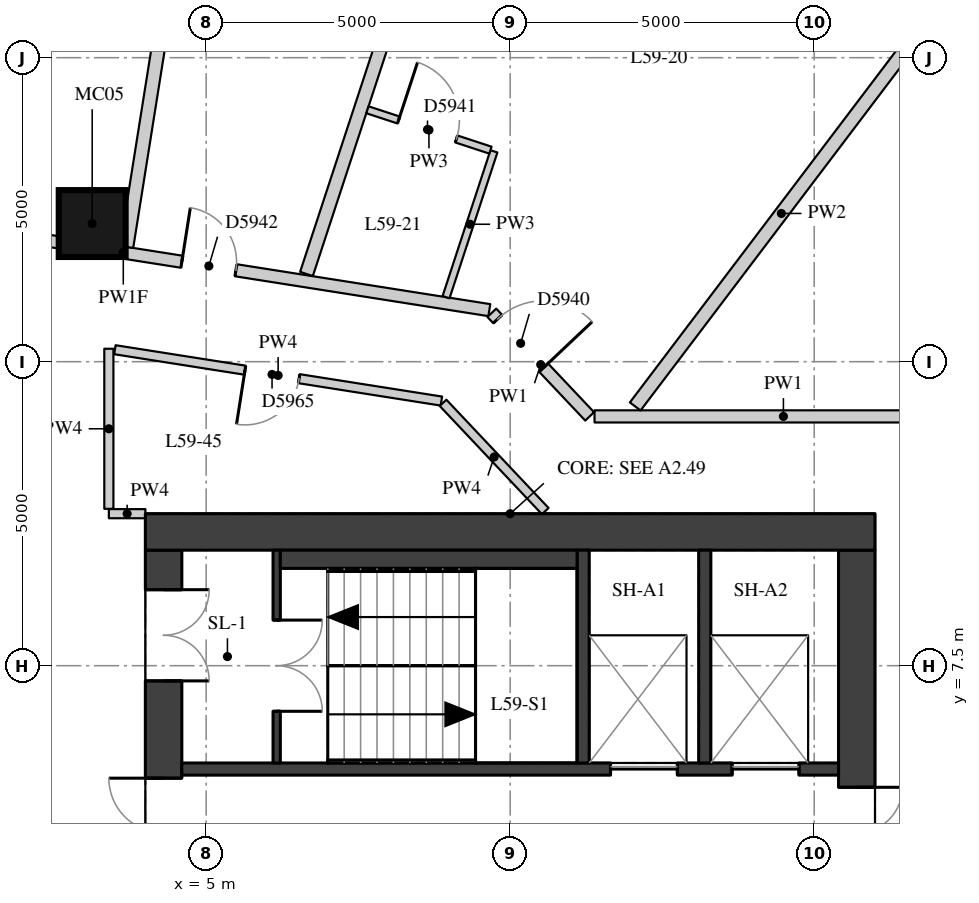
"""IFC4 building model, lengths in metres.
Left out: names, types, materials, properties, quantities, classifications, styles, units other than length and angle.
Written with IfcOpenShell. Run it as: python <this file> out.ifc"""

import sys

from ifc_helpers import new_model, si_unit, direction, frame, frame_2d, origin, origin_2d, place, context, subcontext, project, spatial, rectangle, extrude, element, fill, save


model = new_model("IFC4")
c1 = context("Model", 3, precision=1e-05, world=origin(), true_north=direction((0.0, 1.0)))
c2 = subcontext(c1, "Body", "Model", "MODEL_VIEW")
j1 = project(units=[si_unit("LENGTHUNIT", "METRE"), si_unit("PLANEANGLEUNIT", "RADIAN")], contexts=[c1])
p1 = place(None, origin())
s1 = spatial("IfcSite", under=j1, at=p1, CompositionType="ELEMENT")
p2 = place(p1, origin())
s2 = spatial("IfcBuilding", under=s1, at=p2, CompositionType="ELEMENT")
p3 = place(p2, frame((0.0, 0.0, 209.0)))
s3 = spatial("IfcBuildingStorey", under=s2, at=p3, CompositionType="ELEMENT", Elevation=209.0)
p4 = place(p3, frame((3.126, 14.772, 0.0), z_axis=(0.0, 0.0, 1.0), x_axis=(1.0, 0.0, 0.0)))
e1 = element("IfcColumn", 1, at=p4, inside=s3, PredefinedType="COLUMN", context=c2, shape_type="SweptSolid", body=[
    extrude(rectangle(XDim=1.1, YDim=1.1, at=origin_2d()), origin(), (0.0, 0.0, 1.0), 3.3),
])
p5 = place(p3, frame((4.3, -9.4, 0.0), z_axis=(0.0, 0.0, 1.0), x_axis=(0.0, 1.0, 0.0)))
e2 = element("IfcWall", 2, at=p5, inside=s3, PredefinedType="SHEAR", context=c2, shape_type="SweptSolid", body=[
    extrude(rectangle(XDim=18.8, YDim=0.6, at=frame_2d((9.4, 0.0))), origin(), (0.0, 0.0, 1.0), 3.02),
])
p6 = place(p5, frame((0.65, 0.0, 0.0)))
e3 = element("IfcOpeningElement", 3, at=p6, cuts=e2, PredefinedType="OPENING", context=c2, shape_type="SweptSolid", body=[
    extrude(rectangle(XDim=1.5, YDim=2.1, at=frame_2d((0.75, 1.05))), frame((0.0, 0.31, 0.0), z_axis=(0.0, -1.0, 0.0), x_axis=(1.0, 0.0, 0.0)), (0.0, 0.0, 1.0), 0.62),
])
p7 = place(p5, frame((3.75, 0.0, 0.0)))
e4 = element("IfcOpeningElement", 4, at=p7, cuts=e2, PredefinedType="OPENING", context=c2, shape_type="SweptSolid", body=[
    extrude(rectangle(XDim=1.8, YDim=2.1, at=frame_2d((0.9, 1.05))), frame((0.0, 0.31, 0.0), z_axis=(0.0, -1.0, 0.0), x_axis=(1.0, 0.0, 0.0)), (0.0, 0.0, 1.0), 0.62),
])
p8 = place(p5, frame((6.25, 0.0, 0.0)))
e5 = element("IfcOpeningElement", 5, at=p8, cuts=e2, PredefinedType="OPENING", context=c2, shape_type="SweptSolid", body=[
    extrude(rectangle(XDim=1.1, YDim=2.1, at=frame_2d((0.55, 1.05))), frame((0.0, 0.31, 0.0), z_axis=(0.0, -1.0, 0.0), x_axis=(1.0, 0.0, 0.0)), (0.0, 0.0, 1.0), 0.62),
])
p9 = place(p5, frame((8.9, 0.0, 0.0)))
e6 = element("IfcOpeningElement", 6, at=p9, cuts=e2, PredefinedType="OPENING", context=c2, shape_type="SweptSolid", body=[
    extrude(rectangle(XDim=1.0, YDim=2.1, at=frame_2d((0.5, 1.05))), frame((0.0, 0.31, 0.0), z_axis=(0.0, -1.0, 0.0), x_axis=(1.0, 0.0, 0.0)), (0.0, 0.0, 1.0), 0.62),
])
p10 = place(p5, frame((11.45, 0.0, 0.0)))
e7 = element("IfcOpeningElement", 7, at=p10, cuts=e2, PredefinedType="OPENING", context=c2, shape_type="SweptSolid", body=[
    extrude(rectangle(XDim=1.1, YDim=2.1, at=frame_2d((0.55, 1.05))), frame((0.0, 0.31, 0.0), z_axis=(0.0, -1.0, 0.0), x_axis=(1.0, 0.0, 0.0)), (0.0, 0.0, 1.0), 0.62),
])
p11 = place(p5, frame((13.25, 0.0, 0.0)))
e8 = element("IfcOpeningElement", 8, at=p11, cuts=e2, PredefinedType="OPENING", context=c2, shape_type="SweptSolid", body=[
    extrude(rectangle(XDim=1.8, YDim=2.1, at=frame_2d((0.9, 1.05))), frame((0.0, 0.31, 0.0), z_axis=(0.0, -1.0, 0.0), x_axis=(1.0, 0.0, 0.0)), (0.0, 0.0, 1.0), 0.62),
])
p12 = place(p5, frame((16.65, 0.0, 0.0)))
e9 = element("IfcOpeningElement", 9, at=p12, cuts=e2, PredefinedType="OPENING", context=c2, shape_type="SweptSolid", body=[
    extrude(rectangle(XDim=1.5, YDim=2.1, at=frame_2d((0.75, 1.05))), frame((0.0, 0.31, 0.0), z_axis=(0.0, -1.0, 0.0), x_axis=(1.0, 0.0, 0.0)), (0.0, 0.0, 1.0), 0.62),
])
p13 = place(p3, frame((15.7, -9.4, 0.0), z_axis=(0.0, 0.0, 1.0), x_axis=(0.0, 1.0, 0.0)))
e10 = element("IfcWall", 10, at=p13, inside=s3, PredefinedType="SHEAR", context=c2, shape_type="SweptSolid", body=[
    extrude(rectangle(XDim=18.8, YDim=0.6, at=frame_2d((9.4, 0.0))), origin(), (0.0, 0.0, 1.0), 3.02),
])
p14 = place(p13, frame((13.4, 0.0, 0.0)))
e11 = element("IfcOpeningElement", 11, at=p14, cuts=e10, PredefinedType="OPENING", context=c2, shape_type="SweptSolid", body=[
    extrude(rectangle(XDim=1.5, YDim=2.1, at=frame_2d((0.75, 1.05))), frame((0.0, 0.31, 0.0), z_axis=(0.0, -1.0, 0.0), x_axis=(1.0, 0.0, 0.0)), (0.0, 0.0, 1.0), 0.62),
])
p15 = place(p13, frame((3.9, 0.0, 0.0)))
e12 = element("IfcOpeningElement", 12, at=p15, cuts=e10, PredefinedType="OPENING", context=c2, shape_type="SweptSolid", body=[
    extrude(rectangle(XDim=1.5, YDim=2.1, at=frame_2d((0.75, 1.05))), frame((0.0, 0.31, 0.0), z_axis=(0.0, -1.0, 0.0), x_axis=(1.0, 0.0, 0.0)), (0.0, 0.0, 1.0), 0.62),
])
p16 = place(p3, frame((4.0, 9.7, 0.0), z_axis=(0.0, 0.0, 1.0), x_axis=(1.0, 0.0, 0.0)))
e13 = element("IfcWall", 13, at=p16, inside=s3, PredefinedType="SHEAR", context=c2, shape_type="SweptSolid", body=[
    extrude(rectangle(XDim=12.0, YDim=0.6, at=frame_2d((6.0, 0.0))), origin(), (0.0, 0.0, 1.0), 3.02),
])
p17 = place(p3, frame((4.6, 5.8, 0.0), z_axis=(0.0, 0.0, 1.0), x_axis=(1.0, 0.0, 0.0)))
e14 = element("IfcWall", 14, at=p17, inside=s3, PredefinedType="SHEAR", context=c2, shape_type="SweptSolid", body=[
    extrude(rectangle(XDim=10.8, YDim=0.2, at=frame_2d((5.4, 0.0))), origin(), (0.0, 0.0, 1.0), 3.02),
])
p18 = place(p17, frame((7.05, 0.0, 0.0)))
e15 = element("IfcOpeningElement", 15, at=p18, cuts=e14, PredefinedType="OPENING", context=c2, shape_type="SweptSolid", body=[
    extrude(rectangle(XDim=1.1, YDim=2.1, at=frame_2d((0.55, 1.05))), frame((0.0, 0.11, 0.0), z_axis=(0.0, -1.0, 0.0), x_axis=(1.0, 0.0, 0.0)), (0.0, 0.0, 1.0), 0.22),
])
p19 = place(p17, frame((9.05, 0.0, 0.0)))
e16 = element("IfcOpeningElement", 16, at=p19, cuts=e14, PredefinedType="OPENING", context=c2, shape_type="SweptSolid", body=[
    extrude(rectangle(XDim=1.1, YDim=2.1, at=frame_2d((0.55, 1.05))), frame((0.0, 0.11, 0.0), z_axis=(0.0, -1.0, 0.0), x_axis=(1.0, 0.0, 0.0)), (0.0, 0.0, 1.0), 0.22),
])
for number, where, z_axis, x_axis in (
    (17, (11.2, 5.9, 0.0), (0.0, 0.0, 1.0), (0.0, 1.0, 0.0)),
    (18, (13.2, 5.9, 0.0), (0.0, 0.0, 1.0), (0.0, 1.0, 0.0)),
):
    element("IfcWall", number, at=place(p3, frame(where, z_axis=z_axis, x_axis=x_axis)), inside=s3, PredefinedType="SHEAR", context=c2, shape_type="SweptSolid", body=[
        extrude(rectangle(XDim=3.5, YDim=0.2, at=frame_2d((1.75, 0.0))), origin(), (0.0, 0.0, 1.0), 3.02),
    ])
p20 = place(p3, frame((6.16, 5.9, 0.0), z_axis=(0.0, 0.0, 1.0), x_axis=(0.0, 1.0, 0.0)))
e19 = element("IfcWall", 19, at=p20, inside=s3, PredefinedType="SHEAR", context=c2, shape_type="SweptSolid", body=[
    extrude(rectangle(XDim=3.5, YDim=0.12, at=frame_2d((1.75, 0.0))), origin(), (0.0, 0.0, 1.0), 3.02),
])
p21 = place(p20, frame((0.85, 0.0, 0.0)))
e20 = element("IfcOpeningElement", 20, at=p21, cuts=e19, PredefinedType="OPENING", context=c2, shape_type="SweptSolid", body=[
    extrude(rectangle(XDim=1.5, YDim=2.1, at=frame_2d((0.75, 1.05))), frame((0.0, 0.07, 0.0), z_axis=(0.0, -1.0, 0.0), x_axis=(1.0, 0.0, 0.0)), (0.0, 0.0, 1.0), 0.14),
])
p22 = place(p3, frame((6.22, 9.25, 0.0), z_axis=(0.0, 0.0, 1.0), x_axis=(1.0, 0.0, 0.0)))
e21 = element("IfcWall", 21, at=p22, inside=s3, PredefinedType="PARTITIONING", context=c2, shape_type="SweptSolid", body=[
    extrude(rectangle(XDim=4.88, YDim=0.3, at=frame_2d((2.44, 0.0))), origin(), (0.0, 0.0, 1.0), 3.02),
])
p23 = place(p3, frame((-2.383, 15.243, 0.0), z_axis=(0.0, 0.0, 1.0), x_axis=(0.987842256944, -0.15545956193, 0.0)))
e22 = element("IfcWall", 22, at=p23, inside=s3, PredefinedType="PARTITIONING", context=c2, shape_type="SweptSolid", body=[
    extrude(rectangle(XDim=12.188, YDim=0.2, at=frame_2d((6.094, 0.0))), origin(), (0.0, 0.0, 1.0), 2.42),
])
p24 = place(p23, frame((7.069, 0.0, 0.0)))
e23 = element("IfcOpeningElement", 23, at=p24, cuts=e22, PredefinedType="OPENING", context=c2, shape_type="SweptSolid", body=[
    extrude(rectangle(XDim=0.9, YDim=2.1, at=frame_2d((0.45, 1.05))), frame((0.0, 0.11, 0.0), z_axis=(0.0, -1.0, 0.0), x_axis=(1.0, 0.0, 0.0)), (0.0, 0.0, 1.0), 0.22),
])
p25 = place(p23, frame((3.676, 0.0, 0.0)))
e24 = element("IfcOpeningElement", 24, at=p25, cuts=e22, PredefinedType="OPENING", context=c2, shape_type="SweptSolid", body=[
    extrude(rectangle(XDim=0.9, YDim=2.1, at=frame_2d((0.45, 1.05))), frame((0.0, 0.11, 0.0), z_axis=(0.0, -1.0, 0.0), x_axis=(1.0, 0.0, 0.0)), (0.0, 0.0, 1.0), 0.22),
])
p26 = place(p23, frame((1.875, 0.0, 0.0)))
e25 = element("IfcOpeningElement", 25, at=p26, cuts=e22, PredefinedType="OPENING", context=c2, shape_type="SweptSolid", body=[
    extrude(rectangle(XDim=0.9, YDim=2.1, at=frame_2d((0.45, 1.05))), frame((0.0, 0.11, 0.0), z_axis=(0.0, -1.0, 0.0), x_axis=(1.0, 0.0, 0.0)), (0.0, 0.0, 1.0), 0.22),
])
p27 = place(p3, frame((9.698, 13.304, 0.0), z_axis=(0.0, 0.0, 1.0), x_axis=(0.686553169295, -0.727079600684, 0.0)))
e26 = element("IfcWall", 26, at=p27, inside=s3, PredefinedType="PARTITIONING", context=c2, shape_type="SweptSolid", body=[
    extrude(rectangle(XDim=2.344, YDim=0.2, at=frame_2d((1.172, 0.0))), origin(), (0.0, 0.0, 1.0), 3.02),
])
p28 = place(p27, frame((0.14, 0.0, 0.0)))
e27 = element("IfcOpeningElement", 27, at=p28, cuts=e26, PredefinedType="OPENING", context=c2, shape_type="SweptSolid", body=[
    extrude(rectangle(XDim=1.1, YDim=2.1, at=frame_2d((0.55, 1.05))), frame((0.0, 0.11, 0.0), z_axis=(0.0, -1.0, 0.0), x_axis=(1.0, 0.0, 0.0)), (0.0, 0.0, 1.0), 0.22),
])
p29 = place(p3, frame((11.387, 11.6, 0.0), z_axis=(0.0, 0.0, 1.0), x_axis=(1.0, 0.0, 0.0)))
e28 = element("IfcWall", 28, at=p29, inside=s3, PredefinedType="PARTITIONING", context=c2, shape_type="SweptSolid", body=[
    extrude(rectangle(XDim=6.213, YDim=0.2, at=frame_2d((3.106, 0.0))), origin(), (0.0, 0.0, 1.0), 3.02),
])
p30 = place(p3, frame((4.001, 10.0, 0.0), z_axis=(0.0, 0.0, 1.0), x_axis=(-1.0, 0.0, 0.0)))
e29 = element("IfcWall", 29, at=p30, inside=s3, PredefinedType="PARTITIONING", context=c2, shape_type="SweptSolid", body=[
    extrude(rectangle(XDim=0.601, YDim=0.15, at=frame_2d((0.301, 0.0))), origin(), (0.0, 0.0, 1.0), 3.02),
])
p31 = place(p3, frame((3.4, 10.08, 0.0), z_axis=(0.0, 0.0, 1.0), x_axis=(0.0, 1.0, 0.0)))
e30 = element("IfcWall", 30, at=p31, inside=s3, PredefinedType="PARTITIONING", context=c2, shape_type="SweptSolid", body=[
    extrude(rectangle(XDim=2.633, YDim=0.15, at=frame_2d((1.316, 0.0))), origin(), (0.0, 0.0, 1.0), 3.02),
])
p32 = place(p3, frame((3.499, 12.697, 0.0), z_axis=(0.0, 0.0, 1.0), x_axis=(0.987853106423, -0.155390605029, 0.0)))
e31 = element("IfcWall", 31, at=p32, inside=s3, PredefinedType="PARTITIONING", context=c2, shape_type="SweptSolid", body=[
    extrude(rectangle(XDim=5.436, YDim=0.15, at=frame_2d((2.718, 0.0))), origin(), (0.0, 0.0, 1.0), 3.02),
])
p33 = place(p32, frame((2.167, 0.0, 0.0)))
e32 = element("IfcOpeningElement", 32, at=p33, cuts=e31, PredefinedType="OPENING", context=c2, shape_type="SweptSolid", body=[
    extrude(rectangle(XDim=0.9, YDim=2.1, at=frame_2d((0.45, 1.05))), frame((0.0, 0.085, 0.0), z_axis=(0.0, -1.0, 0.0), x_axis=(1.0, 0.0, 0.0)), (0.0, 0.0, 1.0), 0.17),
])
p34 = place(p3, frame((8.896, 11.823, 0.0), z_axis=(0.0, 0.0, 1.0), x_axis=(0.686471254033, -0.727156941373, 0.0)))
e33 = element("IfcWall", 33, at=p34, inside=s3, PredefinedType="PARTITIONING", context=c2, shape_type="SweptSolid", body=[
    extrude(rectangle(XDim=2.448, YDim=0.15, at=frame_2d((1.224, 0.0))), origin(), (0.0, 0.0, 1.0), 3.02),
])
p35 = place(p3, frame((16.863, 18.113, 0.0), z_axis=(0.0, 0.0, 1.0), x_axis=(-0.603628639054, -0.797265618294, 0.0)))
e34 = element("IfcWall", 34, at=p35, inside=s3, PredefinedType="PARTITIONING", context=c2, shape_type="SweptSolid", body=[
    extrude(rectangle(XDim=7.963, YDim=0.22, at=frame_2d((3.982, 0.0))), origin(), (0.0, 0.0, 1.0), 3.02),
])
p36 = place(p3, frame((9.307, 22.035, 0.0), z_axis=(0.0, 0.0, 1.0), x_axis=(-0.311959631661, -0.950095357432, 0.0)))
e35 = element("IfcWall", 35, at=p36, inside=s3, PredefinedType="PARTITIONING", context=c2, shape_type="SweptSolid", body=[
    extrude(rectangle(XDim=8.518, YDim=0.22, at=frame_2d((4.259, 0.0))), origin(), (0.0, 0.0, 1.0), 3.02),
])
p37 = place(p3, frame((5.071, 23.056, 0.0), z_axis=(0.0, 0.0, 1.0), x_axis=(-0.157127996446, -0.987578246385, 0.0)))
e36 = element("IfcWall", 36, at=p37, inside=s3, PredefinedType="PARTITIONING", context=c2, shape_type="SweptSolid", body=[
    extrude(rectangle(XDim=8.777, YDim=0.22, at=frame_2d((4.389, 0.0))), origin(), (0.0, 0.0, 1.0), 2.47),
])
p38 = place(p3, frame((8.945, 13.561, 0.0), z_axis=(0.0, 0.0, 1.0), x_axis=(0.311960021399, 0.950095229463, 0.0)))
e37 = element("IfcWall", 37, at=p38, inside=s3, PredefinedType="PARTITIONING", context=c2, shape_type="SweptSolid", body=[
    extrude(rectangle(XDim=2.525, YDim=0.12, at=frame_2d((1.262, 0.0))), origin(), (0.0, 0.0, 1.0), 3.02),
])
p39 = place(p3, frame((9.676, 15.979, 0.0), z_axis=(0.0, 0.0, 1.0), x_axis=(-0.950106513103, 0.311925654217, 0.0)))
e38 = element("IfcWall", 38, at=p39, inside=s3, PredefinedType="PARTITIONING", context=c2, shape_type="SweptSolid", body=[
    extrude(rectangle(XDim=2.13, YDim=0.12, at=frame_2d((1.065, 0.0))), origin(), (0.0, 0.0, 1.0), 3.02),
])
p40 = place(p39, frame((0.59, 0.0, 0.0)))
e39 = element("IfcOpeningElement", 39, at=p40, cuts=e38, PredefinedType="OPENING", context=c2, shape_type="SweptSolid", body=[
    extrude(rectangle(XDim=1.0, YDim=2.1, at=frame_2d((0.5, 1.05))), frame((0.0, 0.07, 0.0), z_axis=(0.0, -1.0, 0.0), x_axis=(1.0, 0.0, 0.0)), (0.0, 0.0, 1.0), 0.14),
])
p41 = place(p11, origin())
e40 = element("IfcDoor", 40, at=p41, inside=s3, OperationType="DOUBLE_DOOR_SINGLE_SWING", PredefinedType="DOOR", context=c2, shape_type="SweptSolid", body=[
    extrude(rectangle(XDim=1.8, YDim=2.1, at=frame_2d((0.9, 1.05))), frame((0.0, 0.025, 0.0), z_axis=(0.0, -1.0, 0.0), x_axis=(1.0, 0.0, 0.0)), (0.0, 0.0, 1.0), 0.05),
])
fill(e8, e40)
p42 = place(p12, origin())
e41 = element("IfcDoor", 41, at=p42, inside=s3, OperationType="DOUBLE_DOOR_SINGLE_SWING", PredefinedType="DOOR", context=c2, shape_type="SweptSolid", body=[
    extrude(rectangle(XDim=1.5, YDim=2.1, at=frame_2d((0.75, 1.05))), frame((0.0, 0.025, 0.0), z_axis=(0.0, -1.0, 0.0), x_axis=(1.0, 0.0, 0.0)), (0.0, 0.0, 1.0), 0.05),
])
fill(e9, e41)
p43 = place(p14, origin())
e42 = element("IfcDoor", 42, at=p43, inside=s3, OperationType="DOUBLE_DOOR_SINGLE_SWING", PredefinedType="DOOR", context=c2, shape_type="SweptSolid", body=[
    extrude(rectangle(XDim=1.5, YDim=2.1, at=frame_2d((0.75, 1.05))), frame((0.0, 0.025, 0.0), z_axis=(0.0, -1.0, 0.0), x_axis=(1.0, 0.0, 0.0)), (0.0, 0.0, 1.0), 0.05),
])
fill(e11, e42)
p44 = place(p21, origin())
e43 = element("IfcDoor", 43, at=p44, inside=s3, OperationType="DOUBLE_DOOR_SINGLE_SWING", PredefinedType="DOOR", context=c2, shape_type="SweptSolid", body=[
    extrude(rectangle(XDim=1.5, YDim=2.1, at=frame_2d((0.75, 1.05))), frame((0.0, 0.025, 0.0), z_axis=(0.0, -1.0, 0.0), x_axis=(1.0, 0.0, 0.0)), (0.0, 0.0, 1.0), 0.05),
])
fill(e20, e43)
p45 = place(p18, origin())
e44 = element("IfcDoor", 44, at=p45, inside=s3, OperationType="DOUBLE_DOOR_SLIDING", PredefinedType="DOOR", context=c2, shape_type="SweptSolid", body=[
    extrude(rectangle(XDim=1.1, YDim=2.1, at=frame_2d((0.55, 1.05))), frame((0.0, 0.025, 0.0), z_axis=(0.0, -1.0, 0.0), x_axis=(1.0, 0.0, 0.0)), (0.0, 0.0, 1.0), 0.05),
])
fill(e15, e44)
p46 = place(p19, origin())
e45 = element("IfcDoor", 45, at=p46, inside=s3, OperationType="DOUBLE_DOOR_SLIDING", PredefinedType="DOOR", context=c2, shape_type="SweptSolid", body=[
    extrude(rectangle(XDim=1.1, YDim=2.1, at=frame_2d((0.55, 1.05))), frame((0.0, 0.025, 0.0), z_axis=(0.0, -1.0, 0.0), x_axis=(1.0, 0.0, 0.0)), (0.0, 0.0, 1.0), 0.05),
])
fill(e16, e45)
p47 = place(p28, origin())
e46 = element("IfcDoor", 46, at=p47, inside=s3, OperationType="SINGLE_SWING_RIGHT", PredefinedType="DOOR", context=c2, shape_type="SweptSolid", body=[
    extrude(rectangle(XDim=1.1, YDim=2.1, at=frame_2d((0.55, 1.05))), frame((0.0, 0.025, 0.0), z_axis=(0.0, -1.0, 0.0), x_axis=(1.0, 0.0, 0.0)), (0.0, 0.0, 1.0), 0.05),
])
fill(e27, e46)
p48 = place(p40, origin())
e47 = element("IfcDoor", 47, at=p48, inside=s3, OperationType="SINGLE_SWING_LEFT", PredefinedType="DOOR", context=c2, shape_type="SweptSolid", body=[
    extrude(rectangle(XDim=1.0, YDim=2.1, at=frame_2d((0.5, 1.05))), frame((0.0, 0.025, 0.0), z_axis=(0.0, -1.0, 0.0), x_axis=(1.0, 0.0, 0.0)), (0.0, 0.0, 1.0), 0.05),
])
fill(e39, e47)
p49 = place(p24, origin())
e48 = element("IfcDoor", 48, at=p49, inside=s3, OperationType="SINGLE_SWING_LEFT", PredefinedType="DOOR", context=c2, shape_type="SweptSolid", body=[
    extrude(rectangle(XDim=0.9, YDim=2.1, at=frame_2d((0.45, 1.05))), frame((0.0, 0.025, 0.0), z_axis=(0.0, -1.0, 0.0), x_axis=(1.0, 0.0, 0.0)), (0.0, 0.0, 1.0), 0.05),
])
fill(e23, e48)
p50 = place(p33, origin())
e49 = element("IfcDoor", 49, at=p50, inside=s3, OperationType="SINGLE_SWING_RIGHT", PredefinedType="DOOR", context=c2, shape_type="SweptSolid", body=[
    extrude(rectangle(XDim=0.9, YDim=2.1, at=frame_2d((0.45, 1.05))), frame((0.0, 0.025, 0.0), z_axis=(0.0, -1.0, 0.0), x_axis=(1.0, 0.0, 0.0)), (0.0, 0.0, 1.0), 0.05),
])
fill(e32, e49)
save(model, sys.argv[1])
